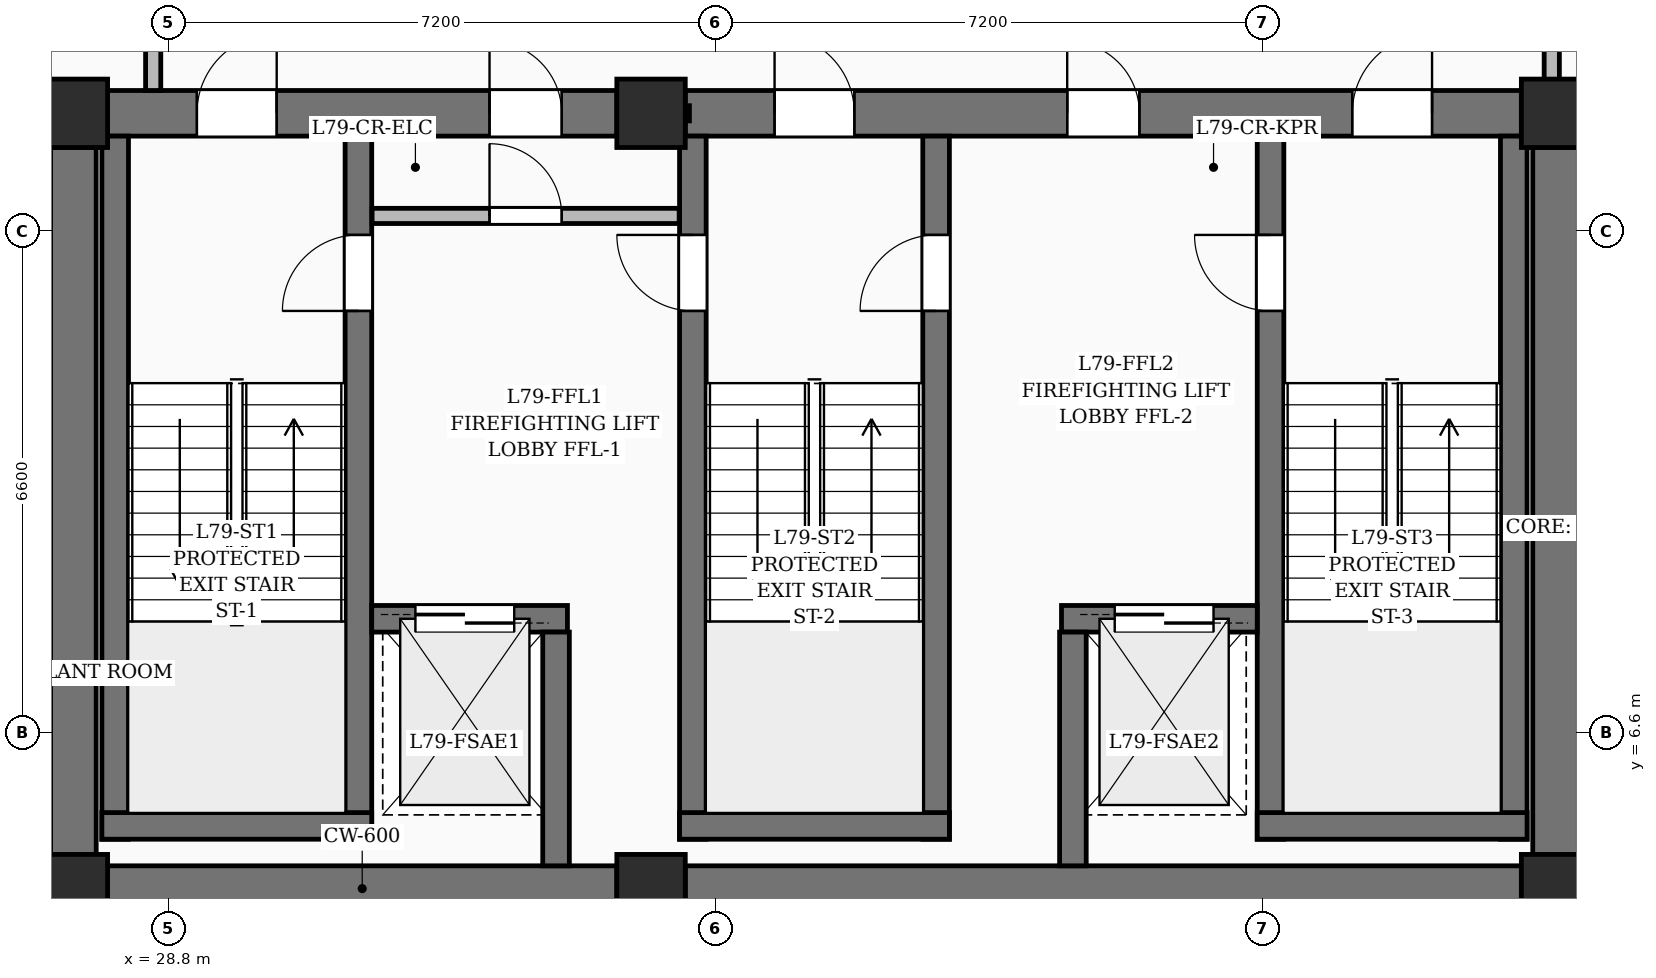
"""IFC4 building model, lengths in metres.
Left out: names, types, materials, properties, quantities, classifications, styles, units other than length and angle.
Written with IfcOpenShell. Run it as: python <this file> out.ifc"""

import sys

from ifc_helpers import new_model, si_unit, direction, frame, frame_2d, origin, origin_2d, place, context, subcontext, project, spatial, rectangle, extrude, element, fill, save


model = new_model("IFC4")
c1 = context("Model", 3, precision=1e-05, world=origin(), true_north=direction((0.0, 1.0)))
c2 = subcontext(c1, "Body", "Model", "MODEL_VIEW")
j1 = project(units=[si_unit("LENGTHUNIT", "METRE"), si_unit("PLANEANGLEUNIT", "RADIAN")], contexts=[c1])
p1 = place(None, origin())
s1 = spatial("IfcSite", under=j1, at=p1, CompositionType="ELEMENT")
p2 = place(p1, origin())
s2 = spatial("IfcBuilding", under=s1, at=p2, CompositionType="ELEMENT")
p3 = place(p2, frame((0.0, 0.0, 306.5)))
s3 = spatial("IfcBuildingStorey", under=s2, at=p3, CompositionType="ELEMENT", Elevation=306.5)
for number, where, z_axis, x_axis in (
    (1, (27.55, 4.55, 0.0), (0.0, 0.0, 1.0), (1.0, 0.0, 0.0)),
    (2, (35.15, 4.55, 0.0), (0.0, 0.0, 1.0), (1.0, 0.0, 0.0)),
    (3, (47.05, 4.55, 0.0), (0.0, 0.0, 1.0), (1.0, 0.0, 0.0)),
    (4, (27.55, 14.75, 0.0), (0.0, 0.0, 1.0), (1.0, 0.0, 0.0)),
    (5, (35.15, 14.75, 0.0), (0.0, 0.0, 1.0), (1.0, 0.0, 0.0)),
    (6, (47.05, 14.75, 0.0), (0.0, 0.0, 1.0), (1.0, 0.0, 0.0)),
):
    element("IfcColumn", number, at=place(p3, frame(where, z_axis=z_axis, x_axis=x_axis)), inside=s3, PredefinedType="COLUMN", context=c2, shape_type="SweptSolid", body=[
        extrude(rectangle(XDim=0.9, YDim=0.9, at=origin_2d()), origin(), (0.0, 0.0, 1.0), 4.0),
    ])
p4 = place(p3, frame((28.0, 4.55, 0.0), z_axis=(0.0, 0.0, 1.0), x_axis=(1.0, 0.0, 0.0)))
e7 = element("IfcWall", 7, at=p4, inside=s3, PredefinedType="SHEAR", context=c2, shape_type="SweptSolid", body=[
    extrude(rectangle(XDim=6.7, YDim=0.6, at=frame_2d((3.35, 0.0))), origin(), (0.0, 0.0, 1.0), 4.0),
])
p5 = place(p3, frame((35.6, 4.55, 0.0), z_axis=(0.0, 0.0, 1.0), x_axis=(1.0, 0.0, 0.0)))
e8 = element("IfcWall", 8, at=p5, inside=s3, PredefinedType="SHEAR", context=c2, shape_type="SweptSolid", body=[
    extrude(rectangle(XDim=11.0, YDim=0.6, at=frame_2d((5.5, 0.0))), origin(), (0.0, 0.0, 1.0), 4.0),
])
p6 = place(p3, frame((28.0, 14.75, 0.0), z_axis=(0.0, 0.0, 1.0), x_axis=(1.0, 0.0, 0.0)))
e9 = element("IfcWall", 9, at=p6, inside=s3, PredefinedType="SHEAR", context=c2, shape_type="SweptSolid", body=[
    extrude(rectangle(XDim=6.7, YDim=0.6, at=frame_2d((3.35, 0.0))), origin(), (0.0, 0.0, 1.0), 4.0),
])
p7 = place(p6, frame((1.175, 0.0, 0.0)))
e10 = element("IfcOpeningElement", 10, at=p7, cuts=e9, PredefinedType="OPENING", context=c2, shape_type="SweptSolid", body=[
    extrude(rectangle(XDim=1.05, YDim=2.15, at=frame_2d((0.525, 1.075))), frame((0.0, 0.31, 0.0), z_axis=(0.0, -1.0, 0.0), x_axis=(1.0, 0.0, 0.0)), (0.0, 0.0, 1.0), 0.62),
])
p8 = place(p6, frame((5.025, 0.0, 0.0)))
e11 = element("IfcOpeningElement", 11, at=p8, cuts=e9, PredefinedType="OPENING", context=c2, shape_type="SweptSolid", body=[
    extrude(rectangle(XDim=0.95, YDim=2.15, at=frame_2d((0.475, 1.075))), frame((0.0, 0.31, 0.0), z_axis=(0.0, -1.0, 0.0), x_axis=(1.0, 0.0, 0.0)), (0.0, 0.0, 1.0), 0.62),
])
p9 = place(p3, frame((35.6, 14.75, 0.0), z_axis=(0.0, 0.0, 1.0), x_axis=(1.0, 0.0, 0.0)))
e12 = element("IfcWall", 12, at=p9, inside=s3, PredefinedType="SHEAR", context=c2, shape_type="SweptSolid", body=[
    extrude(rectangle(XDim=11.0, YDim=0.6, at=frame_2d((5.5, 0.0))), origin(), (0.0, 0.0, 1.0), 4.0),
])
p10 = place(p9, frame((1.175, 0.0, 0.0)))
e13 = element("IfcOpeningElement", 13, at=p10, cuts=e12, PredefinedType="OPENING", context=c2, shape_type="SweptSolid", body=[
    extrude(rectangle(XDim=1.05, YDim=2.15, at=frame_2d((0.525, 1.075))), frame((0.0, 0.31, 0.0), z_axis=(0.0, -1.0, 0.0), x_axis=(1.0, 0.0, 0.0)), (0.0, 0.0, 1.0), 0.62),
])
p11 = place(p9, frame((8.775, 0.0, 0.0)))
e14 = element("IfcOpeningElement", 14, at=p11, cuts=e12, PredefinedType="OPENING", context=c2, shape_type="SweptSolid", body=[
    extrude(rectangle(XDim=1.05, YDim=2.15, at=frame_2d((0.525, 1.075))), frame((0.0, 0.31, 0.0), z_axis=(0.0, -1.0, 0.0), x_axis=(1.0, 0.0, 0.0)), (0.0, 0.0, 1.0), 0.62),
])
p12 = place(p9, frame((5.025, 0.0, 0.0)))
e15 = element("IfcOpeningElement", 15, at=p12, cuts=e12, PredefinedType="OPENING", context=c2, shape_type="SweptSolid", body=[
    extrude(rectangle(XDim=0.95, YDim=2.15, at=frame_2d((0.475, 1.075))), frame((0.0, 0.31, 0.0), z_axis=(0.0, -1.0, 0.0), x_axis=(1.0, 0.0, 0.0)), (0.0, 0.0, 1.0), 0.62),
])
for number, where, z_axis, x_axis in (
    (16, (27.55, 5.0, 0.0), (0.0, 0.0, 1.0), (0.0, 1.0, 0.0)),
    (17, (47.05, 5.0, 0.0), (0.0, 0.0, 1.0), (0.0, 1.0, 0.0)),
):
    element("IfcWall", number, at=place(p3, frame(where, z_axis=z_axis, x_axis=x_axis)), inside=s3, PredefinedType="SHEAR", context=c2, shape_type="SweptSolid", body=[
        extrude(rectangle(XDim=9.3, YDim=0.6, at=frame_2d((4.65, 0.0))), origin(), (0.0, 0.0, 1.0), 4.0),
    ])
p13 = place(p3, frame((28.1, 5.2, 0.0), z_axis=(0.0, 0.0, 1.0), x_axis=(0.0, 1.0, 0.0)))
e18 = element("IfcWall", 18, at=p13, inside=s3, PredefinedType="SOLIDWALL", context=c2, shape_type="SweptSolid", body=[
    extrude(rectangle(XDim=9.25, YDim=0.35, at=frame_2d((4.625, 0.0))), origin(), (0.0, 0.0, 1.0), 4.0),
])
p14 = place(p3, frame((31.3, 5.2, 0.0), z_axis=(0.0, 0.0, 1.0), x_axis=(0.0, 1.0, 0.0)))
e19 = element("IfcWall", 19, at=p14, inside=s3, PredefinedType="SOLIDWALL", context=c2, shape_type="SweptSolid", body=[
    extrude(rectangle(XDim=9.25, YDim=0.35, at=frame_2d((4.625, 0.0))), origin(), (0.0, 0.0, 1.0), 4.0),
])
p15 = place(p14, frame((6.95, 0.0, 0.0)))
e20 = element("IfcOpeningElement", 20, at=p15, cuts=e19, PredefinedType="OPENING", context=c2, shape_type="SweptSolid", body=[
    extrude(rectangle(XDim=1.0, YDim=2.15, at=frame_2d((0.5, 1.075))), frame((0.0, 0.185, 0.0), z_axis=(0.0, -1.0, 0.0), x_axis=(1.0, 0.0, 0.0)), (0.0, 0.0, 1.0), 0.37),
])
p16 = place(p3, frame((27.925, 5.375, 0.0), z_axis=(0.0, 0.0, 1.0), x_axis=(1.0, 0.0, 0.0)))
e21 = element("IfcWall", 21, at=p16, inside=s3, PredefinedType="SOLIDWALL", context=c2, shape_type="SweptSolid", body=[
    extrude(rectangle(XDim=3.55, YDim=0.35, at=frame_2d((1.775, 0.0))), origin(), (0.0, 0.0, 1.0), 4.0),
])
p17 = place(p3, frame((35.7, 5.2, 0.0), z_axis=(0.0, 0.0, 1.0), x_axis=(0.0, 1.0, 0.0)))
e22 = element("IfcWall", 22, at=p17, inside=s3, PredefinedType="SOLIDWALL", context=c2, shape_type="SweptSolid", body=[
    extrude(rectangle(XDim=9.25, YDim=0.35, at=frame_2d((4.625, 0.0))), origin(), (0.0, 0.0, 1.0), 4.0),
])
p18 = place(p17, frame((6.95, 0.0, 0.0)))
e23 = element("IfcOpeningElement", 23, at=p18, cuts=e22, PredefinedType="OPENING", context=c2, shape_type="SweptSolid", body=[
    extrude(rectangle(XDim=1.0, YDim=2.15, at=frame_2d((0.5, 1.075))), frame((0.0, 0.185, 0.0), z_axis=(0.0, -1.0, 0.0), x_axis=(1.0, 0.0, 0.0)), (0.0, 0.0, 1.0), 0.37),
])
p19 = place(p3, frame((38.9, 5.2, 0.0), z_axis=(0.0, 0.0, 1.0), x_axis=(0.0, 1.0, 0.0)))
e24 = element("IfcWall", 24, at=p19, inside=s3, PredefinedType="SOLIDWALL", context=c2, shape_type="SweptSolid", body=[
    extrude(rectangle(XDim=9.25, YDim=0.35, at=frame_2d((4.625, 0.0))), origin(), (0.0, 0.0, 1.0), 4.0),
])
p20 = place(p19, frame((6.95, 0.0, 0.0)))
e25 = element("IfcOpeningElement", 25, at=p20, cuts=e24, PredefinedType="OPENING", context=c2, shape_type="SweptSolid", body=[
    extrude(rectangle(XDim=1.0, YDim=2.15, at=frame_2d((0.5, 1.075))), frame((0.0, 0.185, 0.0), z_axis=(0.0, -1.0, 0.0), x_axis=(1.0, 0.0, 0.0)), (0.0, 0.0, 1.0), 0.37),
])
p21 = place(p3, frame((35.525, 5.375, 0.0), z_axis=(0.0, 0.0, 1.0), x_axis=(1.0, 0.0, 0.0)))
e26 = element("IfcWall", 26, at=p21, inside=s3, PredefinedType="SOLIDWALL", context=c2, shape_type="SweptSolid", body=[
    extrude(rectangle(XDim=3.55, YDim=0.35, at=frame_2d((1.775, 0.0))), origin(), (0.0, 0.0, 1.0), 4.0),
])
p22 = place(p3, frame((43.3, 5.2, 0.0), z_axis=(0.0, 0.0, 1.0), x_axis=(0.0, 1.0, 0.0)))
e27 = element("IfcWall", 27, at=p22, inside=s3, PredefinedType="SOLIDWALL", context=c2, shape_type="SweptSolid", body=[
    extrude(rectangle(XDim=9.25, YDim=0.35, at=frame_2d((4.625, 0.0))), origin(), (0.0, 0.0, 1.0), 4.0),
])
p23 = place(p22, frame((6.95, 0.0, 0.0)))
e28 = element("IfcOpeningElement", 28, at=p23, cuts=e27, PredefinedType="OPENING", context=c2, shape_type="SweptSolid", body=[
    extrude(rectangle(XDim=1.0, YDim=2.15, at=frame_2d((0.5, 1.075))), frame((0.0, 0.185, 0.0), z_axis=(0.0, -1.0, 0.0), x_axis=(1.0, 0.0, 0.0)), (0.0, 0.0, 1.0), 0.37),
])
p24 = place(p3, frame((46.5, 5.2, 0.0), z_axis=(0.0, 0.0, 1.0), x_axis=(0.0, 1.0, 0.0)))
e29 = element("IfcWall", 29, at=p24, inside=s3, PredefinedType="SOLIDWALL", context=c2, shape_type="SweptSolid", body=[
    extrude(rectangle(XDim=9.25, YDim=0.35, at=frame_2d((4.625, 0.0))), origin(), (0.0, 0.0, 1.0), 4.0),
])
p25 = place(p3, frame((43.125, 5.375, 0.0), z_axis=(0.0, 0.0, 1.0), x_axis=(1.0, 0.0, 0.0)))
e30 = element("IfcWall", 30, at=p25, inside=s3, PredefinedType="SOLIDWALL", context=c2, shape_type="SweptSolid", body=[
    extrude(rectangle(XDim=3.55, YDim=0.35, at=frame_2d((1.775, 0.0))), origin(), (0.0, 0.0, 1.0), 4.0),
])
p26 = place(p3, frame((31.475, 8.1, 0.0), z_axis=(0.0, 0.0, 1.0), x_axis=(1.0, 0.0, 0.0)))
e31 = element("IfcWall", 31, at=p26, inside=s3, PredefinedType="SOLIDWALL", context=c2, shape_type="SweptSolid", body=[
    extrude(rectangle(XDim=2.575, YDim=0.35, at=frame_2d((1.288, 0.0))), origin(), (0.0, 0.0, 1.0), 4.0),
])
p27 = place(p26, frame((0.575, 0.0, 0.0)))
e32 = element("IfcOpeningElement", 32, at=p27, cuts=e31, PredefinedType="OPENING", context=c2, shape_type="SweptSolid", body=[
    extrude(rectangle(XDim=1.3, YDim=2.25, at=frame_2d((0.65, 1.125))), frame((0.0, 0.185, 0.0), z_axis=(0.0, -1.0, 0.0), x_axis=(1.0, 0.0, 0.0)), (0.0, 0.0, 1.0), 0.37),
])
p28 = place(p3, frame((40.55, 8.1, 0.0), z_axis=(0.0, 0.0, 1.0), x_axis=(1.0, 0.0, 0.0)))
e33 = element("IfcWall", 33, at=p28, inside=s3, PredefinedType="SOLIDWALL", context=c2, shape_type="SweptSolid", body=[
    extrude(rectangle(XDim=2.575, YDim=0.35, at=frame_2d((1.288, 0.0))), origin(), (0.0, 0.0, 1.0), 4.0),
])
p29 = place(p28, frame((0.7, 0.0, 0.0)))
e34 = element("IfcOpeningElement", 34, at=p29, cuts=e33, PredefinedType="OPENING", context=c2, shape_type="SweptSolid", body=[
    extrude(rectangle(XDim=1.3, YDim=2.25, at=frame_2d((0.65, 1.125))), frame((0.0, 0.185, 0.0), z_axis=(0.0, -1.0, 0.0), x_axis=(1.0, 0.0, 0.0)), (0.0, 0.0, 1.0), 0.37),
])
for number, where, z_axis, x_axis in (
    (35, (33.9, 4.85, 0.0), (0.0, 0.0, 1.0), (0.0, 1.0, 0.0)),
    (36, (40.7, 4.85, 0.0), (0.0, 0.0, 1.0), (0.0, 1.0, 0.0)),
):
    element("IfcWall", number, at=place(p3, frame(where, z_axis=z_axis, x_axis=x_axis)), inside=s3, PredefinedType="SOLIDWALL", context=c2, shape_type="SweptSolid", body=[
        extrude(rectangle(XDim=3.075, YDim=0.35, at=frame_2d((1.538, 0.0))), origin(), (0.0, 0.0, 1.0), 4.0),
    ])
p30 = place(p3, frame((34.72, 14.75, 0.0), z_axis=(0.0, 0.0, 1.0), x_axis=(1.0, 0.0, 0.0)))
e37 = element("IfcWall", 37, at=p30, inside=s3, PredefinedType="PARTITIONING", context=c2, shape_type="SweptSolid", body=[
    extrude(rectangle(XDim=0.935, YDim=0.2, at=frame_2d((0.468, 0.0))), origin(), (0.0, 0.0, 1.0), 2.885),
])
p31 = place(p3, frame((31.48, 13.4, 0.0), z_axis=(0.0, 0.0, 1.0), x_axis=(1.0, 0.0, 0.0)))
e38 = element("IfcWall", 38, at=p31, inside=s3, PredefinedType="PARTITIONING", context=c2, shape_type="SweptSolid", body=[
    extrude(rectangle(XDim=4.04, YDim=0.2, at=frame_2d((2.02, 0.0))), origin(), (0.0, 0.0, 1.0), 3.7),
])
p32 = place(p31, frame((1.545, 0.0, 0.0)))
e39 = element("IfcOpeningElement", 39, at=p32, cuts=e38, PredefinedType="OPENING", context=c2, shape_type="SweptSolid", body=[
    extrude(rectangle(XDim=0.95, YDim=2.15, at=frame_2d((0.475, 1.075))), frame((0.0, 0.11, 0.0), z_axis=(0.0, -1.0, 0.0), x_axis=(1.0, 0.0, 0.0)), (0.0, 0.0, 1.0), 0.22),
])
p33 = place(p3, frame((28.6, 17.565, 0.0), z_axis=(0.0, 0.0, 1.0), x_axis=(0.0, -1.0, 0.0)))
e40 = element("IfcWall", 40, at=p33, inside=s3, PredefinedType="PARTITIONING", context=c2, shape_type="SweptSolid", body=[
    extrude(rectangle(XDim=2.515, YDim=0.2, at=frame_2d((1.257, 0.0))), origin(), (0.0, 0.0, 1.0), 3.035),
])
p34 = place(p33, frame((0.765, 0.0, 0.0)))
e41 = element("IfcOpeningElement", 41, at=p34, cuts=e40, PredefinedType="OPENING", context=c2, shape_type="SweptSolid", body=[
    extrude(rectangle(XDim=0.9, YDim=2.1, at=frame_2d((0.45, 1.05))), frame((0.0, 0.11, 0.0), z_axis=(0.0, -1.0, 0.0), x_axis=(1.0, 0.0, 0.0)), (0.0, 0.0, 1.0), 0.22),
])
p35 = place(p3, frame((47.0, 15.05, 0.0), z_axis=(0.0, 0.0, 1.0), x_axis=(0.0, 1.0, 0.0)))
e42 = element("IfcWall", 42, at=p35, inside=s3, PredefinedType="PARTITIONING", context=c2, shape_type="SweptSolid", body=[
    extrude(rectangle(XDim=2.6, YDim=0.2, at=frame_2d((1.3, 0.0))), origin(), (0.0, 0.0, 1.0), 3.035),
])
p36 = place(p7, origin())
e43 = element("IfcDoor", 43, at=p36, inside=s3, OperationType="SINGLE_SWING_RIGHT", PredefinedType="DOOR", context=c2, shape_type="SweptSolid", body=[
    extrude(rectangle(XDim=1.05, YDim=2.15, at=frame_2d((0.525, 1.075))), frame((0.0, 0.025, 0.0), z_axis=(0.0, -1.0, 0.0), x_axis=(1.0, 0.0, 0.0)), (0.0, 0.0, 1.0), 0.05),
])
fill(e10, e43)
p37 = place(p10, origin())
e44 = element("IfcDoor", 44, at=p37, inside=s3, OperationType="SINGLE_SWING_LEFT", PredefinedType="DOOR", context=c2, shape_type="SweptSolid", body=[
    extrude(rectangle(XDim=1.05, YDim=2.15, at=frame_2d((0.525, 1.075))), frame((0.0, 0.025, 0.0), z_axis=(0.0, -1.0, 0.0), x_axis=(1.0, 0.0, 0.0)), (0.0, 0.0, 1.0), 0.05),
])
fill(e13, e44)
p38 = place(p11, origin())
e45 = element("IfcDoor", 45, at=p38, inside=s3, OperationType="SINGLE_SWING_RIGHT", PredefinedType="DOOR", context=c2, shape_type="SweptSolid", body=[
    extrude(rectangle(XDim=1.05, YDim=2.15, at=frame_2d((0.525, 1.075))), frame((0.0, 0.025, 0.0), z_axis=(0.0, -1.0, 0.0), x_axis=(1.0, 0.0, 0.0)), (0.0, 0.0, 1.0), 0.05),
])
fill(e14, e45)
p39 = place(p15, origin())
e46 = element("IfcDoor", 46, at=p39, inside=s3, OperationType="SINGLE_SWING_LEFT", PredefinedType="DOOR", context=c2, shape_type="SweptSolid", body=[
    extrude(rectangle(XDim=1.0, YDim=2.15, at=frame_2d((0.5, 1.075))), frame((0.0, 0.025, 0.0), z_axis=(0.0, -1.0, 0.0), x_axis=(1.0, 0.0, 0.0)), (0.0, 0.0, 1.0), 0.05),
])
fill(e20, e46)
p40 = place(p18, origin())
e47 = element("IfcDoor", 47, at=p40, inside=s3, OperationType="SINGLE_SWING_RIGHT", PredefinedType="DOOR", context=c2, shape_type="SweptSolid", body=[
    extrude(rectangle(XDim=1.0, YDim=2.15, at=frame_2d((0.5, 1.075))), frame((0.0, 0.025, 0.0), z_axis=(0.0, -1.0, 0.0), x_axis=(1.0, 0.0, 0.0)), (0.0, 0.0, 1.0), 0.05),
])
fill(e23, e47)
p41 = place(p20, origin())
e48 = element("IfcDoor", 48, at=p41, inside=s3, OperationType="SINGLE_SWING_LEFT", PredefinedType="DOOR", context=c2, shape_type="SweptSolid", body=[
    extrude(rectangle(XDim=1.0, YDim=2.15, at=frame_2d((0.5, 1.075))), frame((0.0, 0.025, 0.0), z_axis=(0.0, -1.0, 0.0), x_axis=(1.0, 0.0, 0.0)), (0.0, 0.0, 1.0), 0.05),
])
fill(e25, e48)
p42 = place(p23, origin())
e49 = element("IfcDoor", 49, at=p42, inside=s3, OperationType="SINGLE_SWING_RIGHT", PredefinedType="DOOR", context=c2, shape_type="SweptSolid", body=[
    extrude(rectangle(XDim=1.0, YDim=2.15, at=frame_2d((0.5, 1.075))), frame((0.0, 0.025, 0.0), z_axis=(0.0, -1.0, 0.0), x_axis=(1.0, 0.0, 0.0)), (0.0, 0.0, 1.0), 0.05),
])
fill(e28, e49)
p43 = place(p27, origin())
e50 = element("IfcDoor", 50, at=p43, inside=s3, OperationType="DOUBLE_DOOR_SLIDING", PredefinedType="DOOR", context=c2, shape_type="SweptSolid", body=[
    extrude(rectangle(XDim=1.3, YDim=2.25, at=frame_2d((0.65, 1.125))), frame((0.0, 0.025, 0.0), z_axis=(0.0, -1.0, 0.0), x_axis=(1.0, 0.0, 0.0)), (0.0, 0.0, 1.0), 0.05),
])
fill(e32, e50)
p44 = place(p29, origin())
e51 = element("IfcDoor", 51, at=p44, inside=s3, OperationType="DOUBLE_DOOR_SLIDING", PredefinedType="DOOR", context=c2, shape_type="SweptSolid", body=[
    extrude(rectangle(XDim=1.3, YDim=2.25, at=frame_2d((0.65, 1.125))), frame((0.0, 0.025, 0.0), z_axis=(0.0, -1.0, 0.0), x_axis=(1.0, 0.0, 0.0)), (0.0, 0.0, 1.0), 0.05),
])
fill(e34, e51)
p45 = place(p32, origin())
e52 = element("IfcDoor", 52, at=p45, inside=s3, OperationType="SINGLE_SWING_LEFT", PredefinedType="DOOR", context=c2, shape_type="SweptSolid", body=[
    extrude(rectangle(XDim=0.95, YDim=2.15, at=frame_2d((0.475, 1.075))), frame((0.0, 0.025, 0.0), z_axis=(0.0, -1.0, 0.0), x_axis=(1.0, 0.0, 0.0)), (0.0, 0.0, 1.0), 0.05),
])
fill(e39, e52)
p46 = place(p8, origin())
e53 = element("IfcDoor", 53, at=p46, inside=s3, OperationType="SINGLE_SWING_LEFT", PredefinedType="DOOR", context=c2, shape_type="SweptSolid", body=[
    extrude(rectangle(XDim=0.95, YDim=2.15, at=frame_2d((0.475, 1.075))), frame((0.0, 0.025, 0.0), z_axis=(0.0, -1.0, 0.0), x_axis=(1.0, 0.0, 0.0)), (0.0, 0.0, 1.0), 0.05),
])
fill(e11, e53)
p47 = place(p12, origin())
e54 = element("IfcDoor", 54, at=p47, inside=s3, OperationType="SINGLE_SWING_LEFT", PredefinedType="DOOR", context=c2, shape_type="SweptSolid", body=[
    extrude(rectangle(XDim=0.95, YDim=2.15, at=frame_2d((0.475, 1.075))), frame((0.0, 0.025, 0.0), z_axis=(0.0, -1.0, 0.0), x_axis=(1.0, 0.0, 0.0)), (0.0, 0.0, 1.0), 0.05),
])
fill(e15, e54)
save(model, sys.argv[1])
